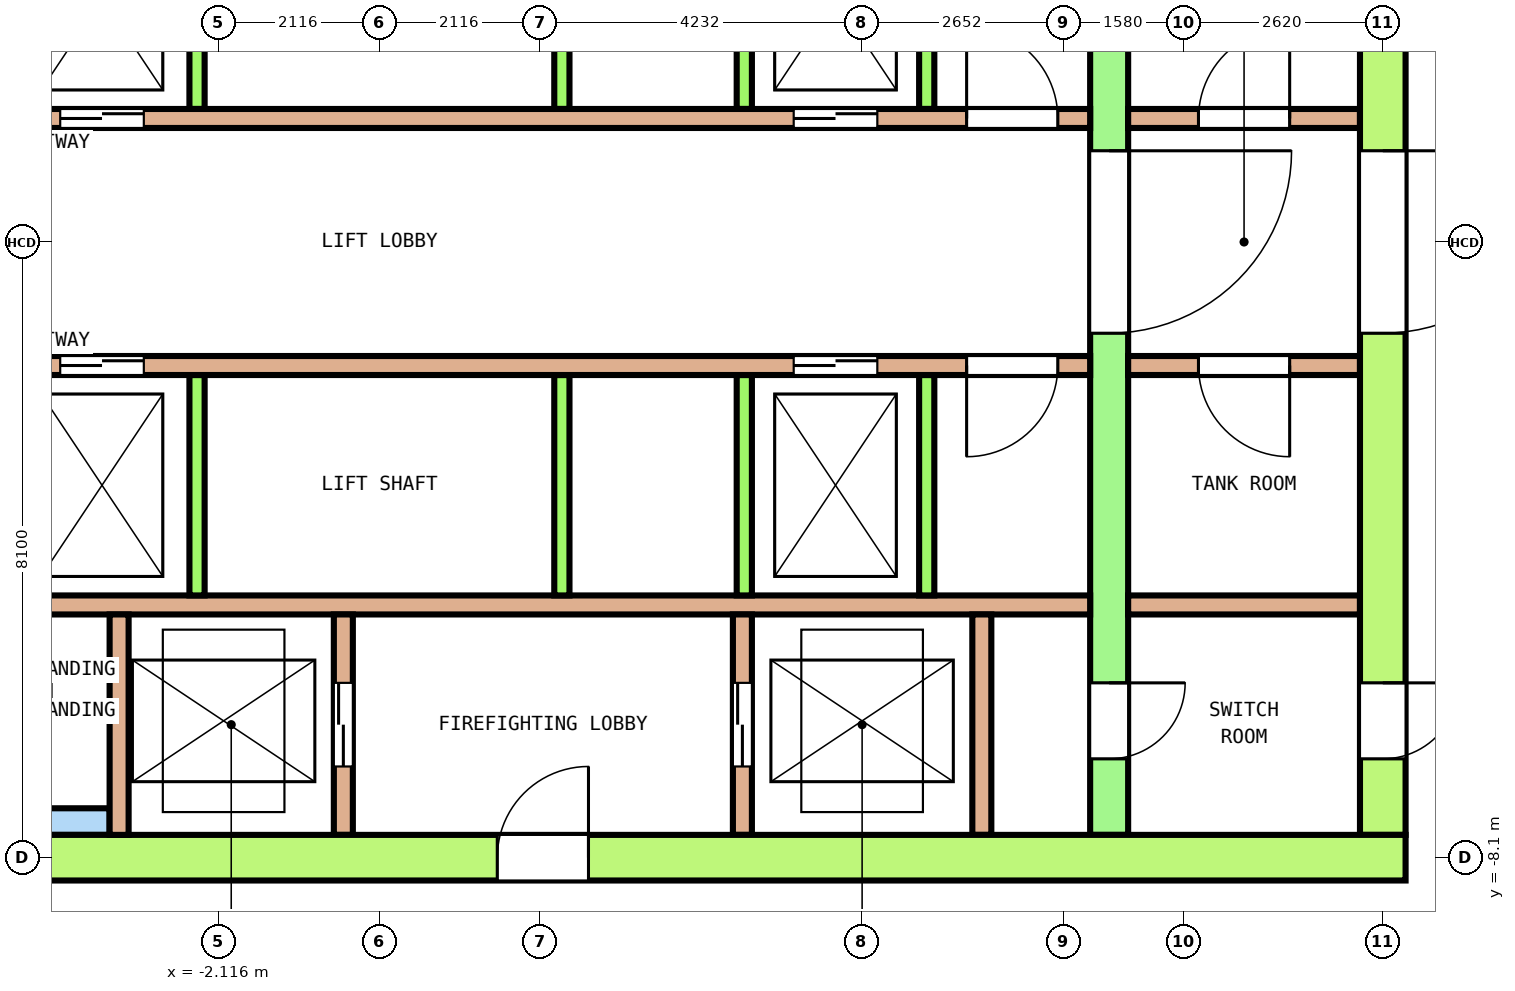
"""IFC4 building model, lengths in metres.
Left out: names, types, materials, properties, quantities, classifications, styles, units other than length and angle.
Written with IfcOpenShell. Run it as: python <this file> out.ifc"""

import sys

from ifc_helpers import new_model, si_unit, direction, frame, frame_2d, origin, place, context, subcontext, project, spatial, rectangle, extrude, element, fill, save


model = new_model("IFC4")
c1 = context("Model", 3, precision=1e-05, world=origin(), true_north=direction((0.0, 1.0)))
c2 = subcontext(c1, "Body", "Model", "MODEL_VIEW")
j1 = project(units=[si_unit("LENGTHUNIT", "METRE"), si_unit("PLANEANGLEUNIT", "RADIAN")], contexts=[c1])
p1 = place(None, origin())
s1 = spatial("IfcSite", under=j1, at=p1, CompositionType="ELEMENT")
p2 = place(p1, origin())
s2 = spatial("IfcBuilding", under=s1, at=p2, CompositionType="ELEMENT")
p3 = place(p2, frame((0.0, 0.0, 202.4)))
s3 = spatial("IfcBuildingStorey", under=s2, at=p3, CompositionType="ELEMENT", Elevation=202.4)
p4 = place(p3, frame((-13.5, -8.1, 0.0), z_axis=(0.0, 0.0, 1.0), x_axis=(1.0, 0.0, 0.0)))
e1 = element("IfcWall", 1, at=p4, inside=s3, PredefinedType="SHEAR", context=c2, shape_type="SweptSolid", body=[
    extrude(rectangle(XDim=27.0, YDim=0.6, at=frame_2d((13.5, 0.0))), origin(), (0.0, 0.0, 1.0), 8.7),
])
p5 = place(p4, frame((15.05, 0.0, 0.0)))
e2 = element("IfcOpeningElement", 2, at=p5, cuts=e1, PredefinedType="OPENING", context=c2, shape_type="SweptSolid", body=[
    extrude(rectangle(XDim=1.2, YDim=2.1, at=frame_2d((0.6, 1.05))), frame((0.0, 0.31, 0.0), z_axis=(0.0, -1.0, 0.0), x_axis=(1.0, 0.0, 0.0)), (0.0, 0.0, 1.0), 0.62),
])
p6 = place(p3, frame((13.2, -7.8, 0.0), z_axis=(0.0, 0.0, 1.0), x_axis=(0.0, 1.0, 0.0)))
e3 = element("IfcWall", 3, at=p6, inside=s3, PredefinedType="SHEAR", context=c2, shape_type="SweptSolid", body=[
    extrude(rectangle(XDim=15.6, YDim=0.6, at=frame_2d((7.8, 0.0))), origin(), (0.0, 0.0, 1.0), 8.7),
])
p7 = place(p6, frame((6.6, 0.0, 0.0)))
e4 = element("IfcOpeningElement", 4, at=p7, cuts=e3, PredefinedType="OPENING", context=c2, shape_type="SweptSolid", body=[
    extrude(rectangle(XDim=2.4, YDim=2.1, at=frame_2d((1.2, 1.05))), frame((0.0, 0.31, 0.0), z_axis=(0.0, -1.0, 0.0), x_axis=(1.0, 0.0, 0.0)), (0.0, 0.0, 1.0), 0.62),
])
p8 = place(p6, frame((13.5, 0.0, 0.0)))
e5 = element("IfcOpeningElement", 5, at=p8, cuts=e3, PredefinedType="OPENING", context=c2, shape_type="SweptSolid", body=[
    extrude(rectangle(XDim=1.2, YDim=2.1, at=frame_2d((0.6, 1.05))), frame((0.0, 0.31, 0.0), z_axis=(0.0, -1.0, 0.0), x_axis=(1.0, 0.0, 0.0)), (0.0, 0.0, 1.0), 0.62),
])
p9 = place(p6, frame((1.0, 0.0, 0.0)))
e6 = element("IfcOpeningElement", 6, at=p9, cuts=e3, PredefinedType="OPENING", context=c2, shape_type="SweptSolid", body=[
    extrude(rectangle(XDim=1.0, YDim=2.1, at=frame_2d((0.5, 1.05))), frame((0.0, 0.31, 0.0), z_axis=(0.0, -1.0, 0.0), x_axis=(1.0, 0.0, 0.0)), (0.0, 0.0, 1.0), 0.62),
])
p10 = place(p3, frame((9.6, -7.8, 0.0), z_axis=(0.0, 0.0, 1.0), x_axis=(0.0, 1.0, 0.0)))
e7 = element("IfcWall", 7, at=p10, inside=s3, PredefinedType="SHEAR", context=c2, shape_type="SweptSolid", body=[
    extrude(rectangle(XDim=15.6, YDim=0.5, at=frame_2d((7.8, 0.0))), origin(), (0.0, 0.0, 1.0), 8.7),
])
p11 = place(p10, frame((6.6, 0.0, 0.0)))
e8 = element("IfcOpeningElement", 8, at=p11, cuts=e7, PredefinedType="OPENING", context=c2, shape_type="SweptSolid", body=[
    extrude(rectangle(XDim=2.4, YDim=2.1, at=frame_2d((1.2, 1.05))), frame((0.0, 0.26, 0.0), z_axis=(0.0, -1.0, 0.0), x_axis=(1.0, 0.0, 0.0)), (0.0, 0.0, 1.0), 0.52),
])
p12 = place(p10, frame((13.5, 0.0, 0.0)))
e9 = element("IfcOpeningElement", 9, at=p12, cuts=e7, PredefinedType="OPENING", context=c2, shape_type="SweptSolid", body=[
    extrude(rectangle(XDim=1.2, YDim=2.1, at=frame_2d((0.6, 1.05))), frame((0.0, 0.26, 0.0), z_axis=(0.0, -1.0, 0.0), x_axis=(1.0, 0.0, 0.0)), (0.0, 0.0, 1.0), 0.52),
])
p13 = place(p10, frame((1.0, 0.0, 0.0)))
e10 = element("IfcOpeningElement", 10, at=p13, cuts=e7, PredefinedType="OPENING", context=c2, shape_type="SweptSolid", body=[
    extrude(rectangle(XDim=1.0, YDim=2.1, at=frame_2d((0.5, 1.05))), frame((0.0, 0.26, 0.0), z_axis=(0.0, -1.0, 0.0), x_axis=(1.0, 0.0, 0.0)), (0.0, 0.0, 1.0), 0.52),
])
p14 = place(p3, frame((-9.35, 1.625, 0.0), z_axis=(0.0, 0.0, 1.0), x_axis=(1.0, 0.0, 0.0)))
e11 = element("IfcWall", 11, at=p14, inside=s3, PredefinedType="SOLIDWALL", context=c2, shape_type="SweptSolid", body=[
    extrude(rectangle(XDim=18.7, YDim=0.25, at=frame_2d((9.35, 0.0))), origin(), (0.0, 0.0, 1.0), 8.7),
])
p15 = place(p14, frame((2.85, 0.0, 0.0)))
e12 = element("IfcOpeningElement", 12, at=p15, cuts=e11, PredefinedType="OPENING", context=c2, shape_type="SweptSolid", body=[
    extrude(rectangle(XDim=1.1, YDim=2.1, at=frame_2d((0.55, 1.05))), frame((0.0, 0.135, 0.0), z_axis=(0.0, -1.0, 0.0), x_axis=(1.0, 0.0, 0.0)), (0.0, 0.0, 1.0), 0.27),
])
p16 = place(p14, frame((5.15, 0.0, 0.0)))
e13 = element("IfcOpeningElement", 13, at=p16, cuts=e11, PredefinedType="OPENING", context=c2, shape_type="SweptSolid", body=[
    extrude(rectangle(XDim=1.1, YDim=2.1, at=frame_2d((0.55, 1.05))), frame((0.0, 0.135, 0.0), z_axis=(0.0, -1.0, 0.0), x_axis=(1.0, 0.0, 0.0)), (0.0, 0.0, 1.0), 0.27),
])
p17 = place(p14, frame((14.8, 0.0, 0.0)))
e14 = element("IfcOpeningElement", 14, at=p17, cuts=e11, PredefinedType="OPENING", context=c2, shape_type="SweptSolid", body=[
    extrude(rectangle(XDim=1.1, YDim=2.1, at=frame_2d((0.55, 1.05))), frame((0.0, 0.135, 0.0), z_axis=(0.0, -1.0, 0.0), x_axis=(1.0, 0.0, 0.0)), (0.0, 0.0, 1.0), 0.27),
])
p18 = place(p14, frame((0.425, 0.0, 0.0)))
e15 = element("IfcOpeningElement", 15, at=p18, cuts=e11, PredefinedType="OPENING", context=c2, shape_type="SweptSolid", body=[
    extrude(rectangle(XDim=1.2, YDim=2.1, at=frame_2d((0.6, 1.05))), frame((0.0, 0.135, 0.0), z_axis=(0.0, -1.0, 0.0), x_axis=(1.0, 0.0, 0.0)), (0.0, 0.0, 1.0), 0.27),
])
p19 = place(p14, frame((17.075, 0.0, 0.0)))
e16 = element("IfcOpeningElement", 16, at=p19, cuts=e11, PredefinedType="OPENING", context=c2, shape_type="SweptSolid", body=[
    extrude(rectangle(XDim=1.2, YDim=2.1, at=frame_2d((0.6, 1.05))), frame((0.0, 0.135, 0.0), z_axis=(0.0, -1.0, 0.0), x_axis=(1.0, 0.0, 0.0)), (0.0, 0.0, 1.0), 0.27),
])
p20 = place(p3, frame((9.85, 1.625, 0.0), z_axis=(0.0, 0.0, 1.0), x_axis=(1.0, 0.0, 0.0)))
e17 = element("IfcWall", 17, at=p20, inside=s3, PredefinedType="SOLIDWALL", context=c2, shape_type="SweptSolid", body=[
    extrude(rectangle(XDim=3.05, YDim=0.25, at=frame_2d((1.525, 0.0))), origin(), (0.0, 0.0, 1.0), 8.7),
])
p21 = place(p20, frame((0.925, 0.0, 0.0)))
e18 = element("IfcOpeningElement", 18, at=p21, cuts=e17, PredefinedType="OPENING", context=c2, shape_type="SweptSolid", body=[
    extrude(rectangle(XDim=1.2, YDim=2.1, at=frame_2d((0.6, 1.05))), frame((0.0, 0.135, 0.0), z_axis=(0.0, -1.0, 0.0), x_axis=(1.0, 0.0, 0.0)), (0.0, 0.0, 1.0), 0.27),
])
for number, where, z_axis, x_axis in (
    (19, (-2.4, 1.75, 0.0), (0.0, 0.0, 1.0), (0.0, 1.0, 0.0)),
    (20, (2.4, 1.75, 0.0), (0.0, 0.0, 1.0), (0.0, 1.0, 0.0)),
    (21, (4.8, 1.75, 0.0), (0.0, 0.0, 1.0), (0.0, 1.0, 0.0)),
    (22, (7.2, 1.75, 0.0), (0.0, 0.0, 1.0), (0.0, 1.0, 0.0)),
):
    element("IfcWall", number, at=place(p3, frame(where, z_axis=z_axis, x_axis=x_axis)), inside=s3, PredefinedType="SOLIDWALL", context=c2, shape_type="SweptSolid", body=[
        extrude(rectangle(XDim=2.9, YDim=0.2, at=frame_2d((1.45, 0.0))), origin(), (0.0, 0.0, 1.0), 8.7),
    ])
p22 = place(p3, frame((-9.35, -1.625, 0.0), z_axis=(0.0, 0.0, 1.0), x_axis=(1.0, 0.0, 0.0)))
e23 = element("IfcWall", 23, at=p22, inside=s3, PredefinedType="SOLIDWALL", context=c2, shape_type="SweptSolid", body=[
    extrude(rectangle(XDim=18.7, YDim=0.25, at=frame_2d((9.35, 0.0))), origin(), (0.0, 0.0, 1.0), 8.7),
])
p23 = place(p22, frame((2.85, 0.0, 0.0)))
e24 = element("IfcOpeningElement", 24, at=p23, cuts=e23, PredefinedType="OPENING", context=c2, shape_type="SweptSolid", body=[
    extrude(rectangle(XDim=1.1, YDim=2.1, at=frame_2d((0.55, 1.05))), frame((0.0, 0.135, 0.0), z_axis=(0.0, -1.0, 0.0), x_axis=(1.0, 0.0, 0.0)), (0.0, 0.0, 1.0), 0.27),
])
p24 = place(p22, frame((5.15, 0.0, 0.0)))
e25 = element("IfcOpeningElement", 25, at=p24, cuts=e23, PredefinedType="OPENING", context=c2, shape_type="SweptSolid", body=[
    extrude(rectangle(XDim=1.1, YDim=2.1, at=frame_2d((0.55, 1.05))), frame((0.0, 0.135, 0.0), z_axis=(0.0, -1.0, 0.0), x_axis=(1.0, 0.0, 0.0)), (0.0, 0.0, 1.0), 0.27),
])
p25 = place(p22, frame((14.8, 0.0, 0.0)))
e26 = element("IfcOpeningElement", 26, at=p25, cuts=e23, PredefinedType="OPENING", context=c2, shape_type="SweptSolid", body=[
    extrude(rectangle(XDim=1.1, YDim=2.1, at=frame_2d((0.55, 1.05))), frame((0.0, 0.135, 0.0), z_axis=(0.0, -1.0, 0.0), x_axis=(1.0, 0.0, 0.0)), (0.0, 0.0, 1.0), 0.27),
])
p26 = place(p22, frame((0.425, 0.0, 0.0)))
e27 = element("IfcOpeningElement", 27, at=p26, cuts=e23, PredefinedType="OPENING", context=c2, shape_type="SweptSolid", body=[
    extrude(rectangle(XDim=1.2, YDim=2.1, at=frame_2d((0.6, 1.05))), frame((0.0, 0.135, 0.0), z_axis=(0.0, -1.0, 0.0), x_axis=(1.0, 0.0, 0.0)), (0.0, 0.0, 1.0), 0.27),
])
p27 = place(p22, frame((17.075, 0.0, 0.0)))
e28 = element("IfcOpeningElement", 28, at=p27, cuts=e23, PredefinedType="OPENING", context=c2, shape_type="SweptSolid", body=[
    extrude(rectangle(XDim=1.2, YDim=2.1, at=frame_2d((0.6, 1.05))), frame((0.0, 0.135, 0.0), z_axis=(0.0, -1.0, 0.0), x_axis=(1.0, 0.0, 0.0)), (0.0, 0.0, 1.0), 0.27),
])
p28 = place(p3, frame((9.85, -1.625, 0.0), z_axis=(0.0, 0.0, 1.0), x_axis=(1.0, 0.0, 0.0)))
e29 = element("IfcWall", 29, at=p28, inside=s3, PredefinedType="SOLIDWALL", context=c2, shape_type="SweptSolid", body=[
    extrude(rectangle(XDim=3.05, YDim=0.25, at=frame_2d((1.525, 0.0))), origin(), (0.0, 0.0, 1.0), 8.7),
])
p29 = place(p28, frame((0.925, 0.0, 0.0)))
e30 = element("IfcOpeningElement", 30, at=p29, cuts=e29, PredefinedType="OPENING", context=c2, shape_type="SweptSolid", body=[
    extrude(rectangle(XDim=1.2, YDim=2.1, at=frame_2d((0.6, 1.05))), frame((0.0, 0.135, 0.0), z_axis=(0.0, -1.0, 0.0), x_axis=(1.0, 0.0, 0.0)), (0.0, 0.0, 1.0), 0.27),
])
p30 = place(p3, frame((-9.35, -4.775, 0.0), z_axis=(0.0, 0.0, 1.0), x_axis=(1.0, 0.0, 0.0)))
e31 = element("IfcWall", 31, at=p30, inside=s3, PredefinedType="SOLIDWALL", context=c2, shape_type="SweptSolid", body=[
    extrude(rectangle(XDim=18.7, YDim=0.25, at=frame_2d((9.35, 0.0))), origin(), (0.0, 0.0, 1.0), 8.7),
])
p31 = place(p3, frame((9.85, -4.775, 0.0), z_axis=(0.0, 0.0, 1.0), x_axis=(1.0, 0.0, 0.0)))
e32 = element("IfcWall", 32, at=p31, inside=s3, PredefinedType="SOLIDWALL", context=c2, shape_type="SweptSolid", body=[
    extrude(rectangle(XDim=3.05, YDim=0.25, at=frame_2d((1.525, 0.0))), origin(), (0.0, 0.0, 1.0), 8.7),
])
for number, where, z_axis, x_axis in (
    (33, (-2.4, -4.65, 0.0), (0.0, 0.0, 1.0), (0.0, 1.0, 0.0)),
    (34, (2.4, -4.65, 0.0), (0.0, 0.0, 1.0), (0.0, 1.0, 0.0)),
    (35, (4.8, -4.65, 0.0), (0.0, 0.0, 1.0), (0.0, 1.0, 0.0)),
    (36, (7.2, -4.65, 0.0), (0.0, 0.0, 1.0), (0.0, 1.0, 0.0)),
):
    element("IfcWall", number, at=place(p3, frame(where, z_axis=z_axis, x_axis=x_axis)), inside=s3, PredefinedType="SOLIDWALL", context=c2, shape_type="SweptSolid", body=[
        extrude(rectangle(XDim=2.9, YDim=0.2, at=frame_2d((1.45, 0.0))), origin(), (0.0, 0.0, 1.0), 8.7),
    ])
p32 = place(p3, frame((-9.35, -7.625, 0.0), z_axis=(0.0, 0.0, 1.0), x_axis=(1.0, 0.0, 0.0)))
e37 = element("IfcWall", 37, at=p32, inside=s3, PredefinedType="SOLIDWALL", context=c2, shape_type="SweptSolid", body=[
    extrude(rectangle(XDim=5.8, YDim=0.35, at=frame_2d((2.9, 0.0))), origin(), (0.0, 0.0, 1.0), 8.7),
])
p33 = place(p3, frame((-3.425, -7.8, 0.0), z_axis=(0.0, 0.0, 1.0), x_axis=(0.0, 1.0, 0.0)))
e38 = element("IfcWall", 38, at=p33, inside=s3, PredefinedType="SOLIDWALL", context=c2, shape_type="SweptSolid", body=[
    extrude(rectangle(XDim=2.9, YDim=0.25, at=frame_2d((1.45, 0.0))), origin(), (0.0, 0.0, 1.0), 8.7),
])
p34 = place(p3, frame((-0.475, -7.8, 0.0), z_axis=(0.0, 0.0, 1.0), x_axis=(0.0, 1.0, 0.0)))
e39 = element("IfcWall", 39, at=p34, inside=s3, PredefinedType="SOLIDWALL", context=c2, shape_type="SweptSolid", body=[
    extrude(rectangle(XDim=2.9, YDim=0.25, at=frame_2d((1.45, 0.0))), origin(), (0.0, 0.0, 1.0), 8.7),
])
p35 = place(p34, frame((0.9, 0.0, 0.0)))
e40 = element("IfcOpeningElement", 40, at=p35, cuts=e39, PredefinedType="OPENING", context=c2, shape_type="SweptSolid", body=[
    extrude(rectangle(XDim=1.1, YDim=2.1, at=frame_2d((0.55, 1.05))), frame((0.0, 0.135, 0.0), z_axis=(0.0, -1.0, 0.0), x_axis=(1.0, 0.0, 0.0)), (0.0, 0.0, 1.0), 0.27),
])
p36 = place(p3, frame((4.775, -7.8, 0.0), z_axis=(0.0, 0.0, 1.0), x_axis=(0.0, 1.0, 0.0)))
e41 = element("IfcWall", 41, at=p36, inside=s3, PredefinedType="SOLIDWALL", context=c2, shape_type="SweptSolid", body=[
    extrude(rectangle(XDim=2.9, YDim=0.25, at=frame_2d((1.45, 0.0))), origin(), (0.0, 0.0, 1.0), 8.7),
])
p37 = place(p36, frame((0.9, 0.0, 0.0)))
e42 = element("IfcOpeningElement", 42, at=p37, cuts=e41, PredefinedType="OPENING", context=c2, shape_type="SweptSolid", body=[
    extrude(rectangle(XDim=1.1, YDim=2.1, at=frame_2d((0.55, 1.05))), frame((0.0, 0.135, 0.0), z_axis=(0.0, -1.0, 0.0), x_axis=(1.0, 0.0, 0.0)), (0.0, 0.0, 1.0), 0.27),
])
p38 = place(p3, frame((7.925, -7.8, 0.0), z_axis=(0.0, 0.0, 1.0), x_axis=(0.0, 1.0, 0.0)))
e43 = element("IfcWall", 43, at=p38, inside=s3, PredefinedType="SOLIDWALL", context=c2, shape_type="SweptSolid", body=[
    extrude(rectangle(XDim=2.9, YDim=0.25, at=frame_2d((1.45, 0.0))), origin(), (0.0, 0.0, 1.0), 8.7),
])
p39 = place(p16, origin())
e44 = element("IfcDoor", 44, at=p39, inside=s3, OperationType="DOUBLE_DOOR_SLIDING", PredefinedType="DOOR", context=c2, shape_type="SweptSolid", body=[
    extrude(rectangle(XDim=1.1, YDim=2.1, at=frame_2d((0.55, 1.05))), frame((0.0, 0.075, 0.0), z_axis=(0.0, -1.0, 0.0), x_axis=(1.0, 0.0, 0.0)), (0.0, 0.0, 1.0), 0.15),
])
fill(e13, e44)
p40 = place(p17, origin())
e45 = element("IfcDoor", 45, at=p40, inside=s3, OperationType="DOUBLE_DOOR_SLIDING", PredefinedType="DOOR", context=c2, shape_type="SweptSolid", body=[
    extrude(rectangle(XDim=1.1, YDim=2.1, at=frame_2d((0.55, 1.05))), frame((0.0, 0.075, 0.0), z_axis=(0.0, -1.0, 0.0), x_axis=(1.0, 0.0, 0.0)), (0.0, 0.0, 1.0), 0.15),
])
fill(e14, e45)
p41 = place(p24, origin())
e46 = element("IfcDoor", 46, at=p41, inside=s3, OperationType="DOUBLE_DOOR_SLIDING", PredefinedType="DOOR", context=c2, shape_type="SweptSolid", body=[
    extrude(rectangle(XDim=1.1, YDim=2.1, at=frame_2d((0.55, 1.05))), frame((0.0, 0.075, 0.0), z_axis=(0.0, -1.0, 0.0), x_axis=(1.0, 0.0, 0.0)), (0.0, 0.0, 1.0), 0.15),
])
fill(e25, e46)
p42 = place(p25, origin())
e47 = element("IfcDoor", 47, at=p42, inside=s3, OperationType="DOUBLE_DOOR_SLIDING", PredefinedType="DOOR", context=c2, shape_type="SweptSolid", body=[
    extrude(rectangle(XDim=1.1, YDim=2.1, at=frame_2d((0.55, 1.05))), frame((0.0, 0.075, 0.0), z_axis=(0.0, -1.0, 0.0), x_axis=(1.0, 0.0, 0.0)), (0.0, 0.0, 1.0), 0.15),
])
fill(e26, e47)
p43 = place(p35, origin())
e48 = element("IfcDoor", 48, at=p43, inside=s3, OperationType="DOUBLE_DOOR_SLIDING", PredefinedType="DOOR", context=c2, shape_type="SweptSolid", body=[
    extrude(rectangle(XDim=1.1, YDim=2.1, at=frame_2d((0.55, 1.05))), frame((0.0, 0.075, 0.0), z_axis=(0.0, -1.0, 0.0), x_axis=(1.0, 0.0, 0.0)), (0.0, 0.0, 1.0), 0.15),
])
fill(e40, e48)
p44 = place(p37, origin())
e49 = element("IfcDoor", 49, at=p44, inside=s3, OperationType="DOUBLE_DOOR_SLIDING", PredefinedType="DOOR", context=c2, shape_type="SweptSolid", body=[
    extrude(rectangle(XDim=1.1, YDim=2.1, at=frame_2d((0.55, 1.05))), frame((0.0, 0.075, 0.0), z_axis=(0.0, -1.0, 0.0), x_axis=(1.0, 0.0, 0.0)), (0.0, 0.0, 1.0), 0.15),
])
fill(e42, e49)
p45 = place(p11, origin())
e50 = element("IfcDoor", 50, at=p45, inside=s3, OperationType="DOUBLE_DOOR_SINGLE_SWING", PredefinedType="DOOR", context=c2, shape_type="SweptSolid", body=[
    extrude(rectangle(XDim=2.4, YDim=2.1, at=frame_2d((1.2, 1.05))), frame((0.0, 0.2, 0.0), z_axis=(0.0, -1.0, 0.0), x_axis=(1.0, 0.0, 0.0)), (0.0, 0.0, 1.0), 0.4),
])
fill(e8, e50)
p46 = place(p7, origin())
e51 = element("IfcDoor", 51, at=p46, inside=s3, OperationType="DOUBLE_DOOR_SINGLE_SWING", PredefinedType="DOOR", context=c2, shape_type="SweptSolid", body=[
    extrude(rectangle(XDim=2.4, YDim=2.1, at=frame_2d((1.2, 1.05))), frame((0.0, 0.25, 0.0), z_axis=(0.0, -1.0, 0.0), x_axis=(1.0, 0.0, 0.0)), (0.0, 0.0, 1.0), 0.5),
])
fill(e4, e51)
p47 = place(p5, origin())
e52 = element("IfcDoor", 52, at=p47, inside=s3, OperationType="SINGLE_SWING_RIGHT", PredefinedType="DOOR", context=c2, shape_type="SweptSolid", body=[
    extrude(rectangle(XDim=1.2, YDim=2.1, at=frame_2d((0.6, 1.05))), frame((0.0, 0.25, 0.0), z_axis=(0.0, -1.0, 0.0), x_axis=(1.0, 0.0, 0.0)), (0.0, 0.0, 1.0), 0.5),
])
fill(e2, e52)
p48 = place(p13, origin())
e53 = element("IfcDoor", 53, at=p48, inside=s3, OperationType="SINGLE_SWING_RIGHT", PredefinedType="DOOR", context=c2, shape_type="SweptSolid", body=[
    extrude(rectangle(XDim=1.0, YDim=2.1, at=frame_2d((0.5, 1.05))), frame((0.0, 0.2, 0.0), z_axis=(0.0, -1.0, 0.0), x_axis=(1.0, 0.0, 0.0)), (0.0, 0.0, 1.0), 0.4),
])
fill(e10, e53)
p49 = place(p9, origin())
e54 = element("IfcDoor", 54, at=p49, inside=s3, OperationType="SINGLE_SWING_LEFT", PredefinedType="DOOR", context=c2, shape_type="SweptSolid", body=[
    extrude(rectangle(XDim=1.0, YDim=2.1, at=frame_2d((0.5, 1.05))), frame((0.0, 0.25, 0.0), z_axis=(0.0, -1.0, 0.0), x_axis=(1.0, 0.0, 0.0)), (0.0, 0.0, 1.0), 0.5),
])
fill(e6, e54)
p50 = place(p19, origin())
e55 = element("IfcDoor", 55, at=p50, inside=s3, OperationType="SINGLE_SWING_RIGHT", PredefinedType="DOOR", context=c2, shape_type="SweptSolid", body=[
    extrude(rectangle(XDim=1.2, YDim=2.1, at=frame_2d((0.6, 1.05))), frame((0.0, 0.075, 0.0), z_axis=(0.0, -1.0, 0.0), x_axis=(1.0, 0.0, 0.0)), (0.0, 0.0, 1.0), 0.15),
])
fill(e16, e55)
p51 = place(p21, origin())
e56 = element("IfcDoor", 56, at=p51, inside=s3, OperationType="SINGLE_SWING_LEFT", PredefinedType="DOOR", context=c2, shape_type="SweptSolid", body=[
    extrude(rectangle(XDim=1.2, YDim=2.1, at=frame_2d((0.6, 1.05))), frame((0.0, 0.075, 0.0), z_axis=(0.0, -1.0, 0.0), x_axis=(1.0, 0.0, 0.0)), (0.0, 0.0, 1.0), 0.15),
])
fill(e18, e56)
p52 = place(p27, origin())
e57 = element("IfcDoor", 57, at=p52, inside=s3, OperationType="SINGLE_SWING_RIGHT", PredefinedType="DOOR", context=c2, shape_type="SweptSolid", body=[
    extrude(rectangle(XDim=1.2, YDim=2.1, at=frame_2d((0.6, 1.05))), frame((0.0, 0.075, 0.0), z_axis=(0.0, -1.0, 0.0), x_axis=(1.0, 0.0, 0.0)), (0.0, 0.0, 1.0), 0.15),
])
fill(e28, e57)
p53 = place(p29, origin())
e58 = element("IfcDoor", 58, at=p53, inside=s3, OperationType="SINGLE_SWING_LEFT", PredefinedType="DOOR", context=c2, shape_type="SweptSolid", body=[
    extrude(rectangle(XDim=1.2, YDim=2.1, at=frame_2d((0.6, 1.05))), frame((0.0, 0.075, 0.0), z_axis=(0.0, -1.0, 0.0), x_axis=(1.0, 0.0, 0.0)), (0.0, 0.0, 1.0), 0.15),
])
fill(e30, e58)
save(model, sys.argv[1])
